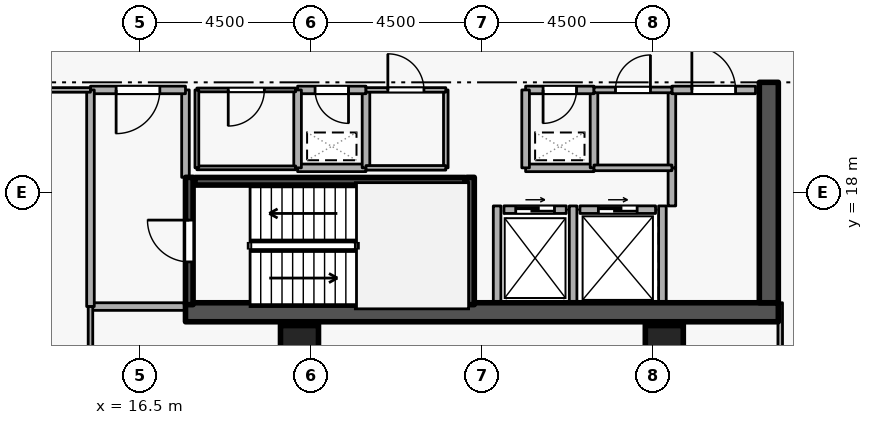
"""IFC4 building model, lengths in metres.
Left out: names, types, materials, properties, quantities, classifications, styles, units other than length and angle.
Written with IfcOpenShell. Run it as: python <this file> out.ifc"""

import sys

from ifc_helpers import new_model, si_unit, direction, frame, frame_2d, origin, origin_2d, place, context, subcontext, project, spatial, rectangle, extrude, element, fill, save


model = new_model("IFC4")
c1 = context("Model", 3, precision=1e-05, world=origin(), true_north=direction((0.0, 1.0)))
c2 = subcontext(c1, "Body", "Model", "MODEL_VIEW")
j1 = project(units=[si_unit("LENGTHUNIT", "METRE"), si_unit("PLANEANGLEUNIT", "RADIAN")], contexts=[c1])
p1 = place(None, origin())
s1 = spatial("IfcSite", under=j1, at=p1, CompositionType="ELEMENT")
p2 = place(p1, origin())
s2 = spatial("IfcBuilding", under=s1, at=p2, CompositionType="ELEMENT")
p3 = place(p2, frame((0.0, 0.0, 203.7)))
s3 = spatial("IfcBuildingStorey", under=s2, at=p3, CompositionType="ELEMENT", Elevation=203.7)
p4 = place(p3, frame((17.7, 14.85, 0.0), z_axis=(0.0, 0.0, 1.0), x_axis=(1.0, 0.0, 0.0)))
e1 = element("IfcWall", 1, at=p4, inside=s3, PredefinedType="SHEAR", context=c2, shape_type="SweptSolid", body=[
    extrude(rectangle(XDim=15.6, YDim=0.5, at=frame_2d((7.8, 0.0))), origin(), (0.0, 0.0, 1.0), 3.6),
])
p5 = place(p3, frame((33.05, 15.1, 0.0), z_axis=(0.0, 0.0, 1.0), x_axis=(0.0, 1.0, 0.0)))
e2 = element("IfcWall", 2, at=p5, inside=s3, PredefinedType="SHEAR", context=c2, shape_type="SweptSolid", body=[
    extrude(rectangle(XDim=5.8, YDim=0.5, at=frame_2d((2.9, 0.0))), origin(), (0.0, 0.0, 1.0), 3.6),
])
for number, where, z_axis, x_axis in (
    (3, (20.7, 14.0, 0.0), (0.0, 0.0, 1.0), (1.0, 0.0, 0.0)),
    (4, (30.3, 14.0, 0.0), (0.0, 0.0, 1.0), (1.0, 0.0, 0.0)),
):
    element("IfcColumn", number, at=place(p3, frame(where, z_axis=z_axis, x_axis=x_axis)), inside=s3, PredefinedType="COLUMN", context=c2, shape_type="SweptSolid", body=[
        extrude(rectangle(XDim=1.0, YDim=1.0, at=origin_2d()), origin(), (0.0, 0.0, 1.0), 3.6),
    ])
p6 = place(p3, frame((26.08, 17.55, 0.0), z_axis=(0.0, 0.0, 1.0), x_axis=(1.0, 0.0, 0.0)))
e5 = element("IfcWall", 5, at=p6, inside=s3, PredefinedType="STANDARD", context=c2, shape_type="SweptSolid", body=[
    extrude(rectangle(XDim=1.64, YDim=0.2, at=frame_2d((0.82, 0.0))), origin(), (0.0, 0.0, 1.0), 3.34),
])
p7 = place(p6, frame((0.31, 0.0, 0.0)))
e6 = element("IfcOpeningElement", 6, at=p7, cuts=e5, PredefinedType="OPENING", context=c2, shape_type="SweptSolid", body=[
    extrude(rectangle(XDim=1.02, YDim=2.06, at=frame_2d((0.51, 1.03))), frame((0.0, 0.11, 0.0), z_axis=(0.0, -1.0, 0.0), x_axis=(1.0, 0.0, 0.0)), (0.0, 0.0, 1.0), 0.22),
])
p8 = place(p3, frame((28.08, 17.55, 0.0), z_axis=(0.0, 0.0, 1.0), x_axis=(1.0, 0.0, 0.0)))
e7 = element("IfcWall", 7, at=p8, inside=s3, PredefinedType="STANDARD", context=c2, shape_type="SweptSolid", body=[
    extrude(rectangle(XDim=1.99, YDim=0.2, at=frame_2d((0.995, 0.0))), origin(), (0.0, 0.0, 1.0), 3.34),
])
p9 = place(p8, frame((0.485, 0.0, 0.0)))
e8 = element("IfcOpeningElement", 8, at=p9, cuts=e7, PredefinedType="OPENING", context=c2, shape_type="SweptSolid", body=[
    extrude(rectangle(XDim=1.02, YDim=2.06, at=frame_2d((0.51, 1.03))), frame((0.0, 0.11, 0.0), z_axis=(0.0, -1.0, 0.0), x_axis=(1.0, 0.0, 0.0)), (0.0, 0.0, 1.0), 0.22),
])
for number, where, z_axis, x_axis in (
    (9, (27.9, 15.112, 0.0), (0.0, 0.0, 1.0), (0.0, 1.0, 0.0)),
    (10, (25.9, 15.112, 0.0), (0.0, 0.0, 1.0), (0.0, 1.0, 0.0)),
    (11, (30.25, 15.112, 0.0), (0.0, 0.0, 1.0), (0.0, 1.0, 0.0)),
):
    element("IfcWall", number, at=place(p3, frame(where, z_axis=z_axis, x_axis=x_axis)), inside=s3, PredefinedType="STANDARD", context=c2, shape_type="SweptSolid", body=[
        extrude(rectangle(XDim=2.536, YDim=0.2, at=frame_2d((1.268, 0.0))), origin(), (0.0, 0.0, 1.0), 3.34),
    ])
p10 = place(p3, frame((17.8, 15.05, 0.0), z_axis=(0.0, 0.0, 1.0), x_axis=(0.0, 1.0, 0.0)))
e12 = element("IfcWall", 12, at=p10, inside=s3, PredefinedType="SHEAR", context=c2, shape_type="SweptSolid", body=[
    extrude(rectangle(XDim=3.35, YDim=0.2, at=frame_2d((1.675, 0.0))), origin(), (0.0, 0.0, 1.0), 3.6),
])
p11 = place(p10, frame((1.125, 0.0, 0.0)))
e13 = element("IfcOpeningElement", 13, at=p11, cuts=e12, PredefinedType="OPENING", context=c2, shape_type="SweptSolid", body=[
    extrude(rectangle(XDim=1.1, YDim=2.1, at=frame_2d((0.55, 1.05))), frame((0.0, 0.11, 0.0), z_axis=(0.0, -1.0, 0.0), x_axis=(1.0, 0.0, 0.0)), (0.0, 0.0, 1.0), 0.22),
])
p12 = place(p3, frame((25.2, 18.4, 0.0), z_axis=(0.0, 0.0, 1.0), x_axis=(0.0, -1.0, 0.0)))
e14 = element("IfcWall", 14, at=p12, inside=s3, PredefinedType="SHEAR", context=c2, shape_type="SweptSolid", body=[
    extrude(rectangle(XDim=3.35, YDim=0.2, at=frame_2d((1.675, 0.0))), origin(), (0.0, 0.0, 1.0), 3.6),
])
p13 = place(p3, frame((25.05, 18.297, 0.0), z_axis=(0.0, 0.0, 1.0), x_axis=(-1.0, 0.0, 0.0)))
e15 = element("IfcWall", 15, at=p13, inside=s3, PredefinedType="SHEAR", context=c2, shape_type="SweptSolid", body=[
    extrude(rectangle(XDim=7.1, YDim=0.2, at=frame_2d((3.55, 0.0))), origin(), (0.0, 0.0, 1.0), 3.6),
])
p14 = place(p3, frame((15.2, 15.0, 0.0), z_axis=(0.0, 0.0, 1.0), x_axis=(1.0, 0.0, 0.0)))
e16 = element("IfcWall", 16, at=p14, inside=s3, PredefinedType="STANDARD", context=c2, shape_type="SweptSolid", body=[
    extrude(rectangle(XDim=2.5, YDim=0.2, at=frame_2d((1.25, 0.0))), origin(), (0.0, 0.0, 1.0), 3.34),
])
p15 = place(p3, frame((17.7, 18.4, 0.0), z_axis=(0.0, 0.0, 1.0), x_axis=(0.0, 1.0, 0.0)))
e17 = element("IfcWall", 17, at=p15, inside=s3, PredefinedType="STANDARD", context=c2, shape_type="SweptSolid", body=[
    extrude(rectangle(XDim=2.3, YDim=0.2, at=frame_2d((1.15, 0.0))), origin(), (0.0, 0.0, 1.0), 2.545),
])
p16 = place(p3, frame((17.7, 20.7, 0.0), z_axis=(0.0, 0.0, 1.0), x_axis=(-1.0, 0.0, 0.0)))
e18 = element("IfcWall", 18, at=p16, inside=s3, PredefinedType="STANDARD", context=c2, shape_type="SweptSolid", body=[
    extrude(rectangle(XDim=2.5, YDim=0.2, at=frame_2d((1.25, 0.0))), origin(), (0.0, 0.0, 1.0), 3.34),
])
p17 = place(p16, frame((0.675, 0.0, 0.0)))
e19 = element("IfcOpeningElement", 19, at=p17, cuts=e18, PredefinedType="OPENING", context=c2, shape_type="SweptSolid", body=[
    extrude(rectangle(XDim=1.15, YDim=2.1, at=frame_2d((0.575, 1.05))), frame((0.0, 0.11, 0.0), z_axis=(0.0, -1.0, 0.0), x_axis=(1.0, 0.0, 0.0)), (0.0, 0.0, 1.0), 0.22),
])
p18 = place(p3, frame((15.2, 20.7, 0.0), z_axis=(0.0, 0.0, 1.0), x_axis=(0.0, -1.0, 0.0)))
e20 = element("IfcWall", 20, at=p18, inside=s3, PredefinedType="STANDARD", context=c2, shape_type="SweptSolid", body=[
    extrude(rectangle(XDim=5.7, YDim=0.2, at=frame_2d((2.85, 0.0))), origin(), (0.0, 0.0, 1.0), 3.34),
])
p19 = place(p3, frame((26.65, 18.65, 0.0), z_axis=(0.0, 0.0, 1.0), x_axis=(1.0, 0.0, 0.0)))
e21 = element("IfcWall", 21, at=p19, inside=s3, PredefinedType="STANDARD", context=c2, shape_type="SweptSolid", body=[
    extrude(rectangle(XDim=1.8, YDim=0.2, at=frame_2d((0.9, 0.0))), origin(), (0.0, 0.0, 1.0), 3.34),
])
p20 = place(p3, frame((28.45, 18.65, 0.0), z_axis=(0.0, 0.0, 1.0), x_axis=(0.0, 1.0, 0.0)))
e22 = element("IfcWall", 22, at=p20, inside=s3, PredefinedType="STANDARD", context=c2, shape_type="SweptSolid", body=[
    extrude(rectangle(XDim=2.05, YDim=0.2, at=frame_2d((1.025, 0.0))), origin(), (0.0, 0.0, 1.0), 3.34),
])
p21 = place(p3, frame((28.45, 20.7, 0.0), z_axis=(0.0, 0.0, 1.0), x_axis=(-1.0, 0.0, 0.0)))
e23 = element("IfcWall", 23, at=p21, inside=s3, PredefinedType="STANDARD", context=c2, shape_type="SweptSolid", body=[
    extrude(rectangle(XDim=1.8, YDim=0.2, at=frame_2d((0.9, 0.0))), origin(), (0.0, 0.0, 1.0), 3.34),
])
p22 = place(p21, frame((0.46, 0.0, 0.0)))
e24 = element("IfcOpeningElement", 24, at=p22, cuts=e23, PredefinedType="OPENING", context=c2, shape_type="SweptSolid", body=[
    extrude(rectangle(XDim=0.88, YDim=2.04, at=frame_2d((0.44, 1.02))), frame((0.0, 0.11, 0.0), z_axis=(0.0, -1.0, 0.0), x_axis=(1.0, 0.0, 0.0)), (0.0, 0.0, 1.0), 0.22),
])
p23 = place(p3, frame((26.65, 20.7, 0.0), z_axis=(0.0, 0.0, 1.0), x_axis=(0.0, -1.0, 0.0)))
e25 = element("IfcWall", 25, at=p23, inside=s3, PredefinedType="STANDARD", context=c2, shape_type="SweptSolid", body=[
    extrude(rectangle(XDim=2.05, YDim=0.2, at=frame_2d((1.025, 0.0))), origin(), (0.0, 0.0, 1.0), 3.34),
])
p24 = place(p3, frame((20.65, 18.65, 0.0), z_axis=(0.0, 0.0, 1.0), x_axis=(1.0, 0.0, 0.0)))
e26 = element("IfcWall", 26, at=p24, inside=s3, PredefinedType="STANDARD", context=c2, shape_type="SweptSolid", body=[
    extrude(rectangle(XDim=1.8, YDim=0.2, at=frame_2d((0.9, 0.0))), origin(), (0.0, 0.0, 1.0), 3.34),
])
p25 = place(p3, frame((22.45, 18.65, 0.0), z_axis=(0.0, 0.0, 1.0), x_axis=(0.0, 1.0, 0.0)))
e27 = element("IfcWall", 27, at=p25, inside=s3, PredefinedType="STANDARD", context=c2, shape_type="SweptSolid", body=[
    extrude(rectangle(XDim=2.05, YDim=0.2, at=frame_2d((1.025, 0.0))), origin(), (0.0, 0.0, 1.0), 3.34),
])
p26 = place(p3, frame((22.45, 20.7, 0.0), z_axis=(0.0, 0.0, 1.0), x_axis=(-1.0, 0.0, 0.0)))
e28 = element("IfcWall", 28, at=p26, inside=s3, PredefinedType="STANDARD", context=c2, shape_type="SweptSolid", body=[
    extrude(rectangle(XDim=1.8, YDim=0.2, at=frame_2d((0.9, 0.0))), origin(), (0.0, 0.0, 1.0), 3.34),
])
p27 = place(p26, frame((0.46, 0.0, 0.0)))
e29 = element("IfcOpeningElement", 29, at=p27, cuts=e28, PredefinedType="OPENING", context=c2, shape_type="SweptSolid", body=[
    extrude(rectangle(XDim=0.88, YDim=2.04, at=frame_2d((0.44, 1.02))), frame((0.0, 0.11, 0.0), z_axis=(0.0, -1.0, 0.0), x_axis=(1.0, 0.0, 0.0)), (0.0, 0.0, 1.0), 0.22),
])
p28 = place(p3, frame((20.65, 20.7, 0.0), z_axis=(0.0, 0.0, 1.0), x_axis=(0.0, -1.0, 0.0)))
e30 = element("IfcWall", 30, at=p28, inside=s3, PredefinedType="STANDARD", context=c2, shape_type="SweptSolid", body=[
    extrude(rectangle(XDim=2.05, YDim=0.2, at=frame_2d((1.025, 0.0))), origin(), (0.0, 0.0, 1.0), 3.34),
])
p29 = place(p3, frame((30.5, 17.648, 0.0), z_axis=(0.0, 0.0, 1.0), x_axis=(0.0, 1.0, 0.0)))
e31 = element("IfcWall", 31, at=p29, inside=s3, PredefinedType="STANDARD", context=c2, shape_type="SweptSolid", body=[
    extrude(rectangle(XDim=1.002, YDim=0.2, at=frame_2d((0.501, 0.0))), origin(), (0.0, 0.0, 1.0), 3.34),
])
p30 = place(p3, frame((30.5, 18.65, 0.0), z_axis=(0.0, 0.0, 1.0), x_axis=(0.0, 1.0, 0.0)))
e32 = element("IfcWall", 32, at=p30, inside=s3, PredefinedType="STANDARD", context=c2, shape_type="SweptSolid", body=[
    extrude(rectangle(XDim=2.05, YDim=0.2, at=frame_2d((1.025, 0.0))), origin(), (0.0, 0.0, 1.0), 3.34),
])
p31 = place(p3, frame((30.5, 20.7, 0.0), z_axis=(0.0, 0.0, 1.0), x_axis=(1.0, 0.0, 0.0)))
e33 = element("IfcWall", 33, at=p31, inside=s3, PredefinedType="STANDARD", context=c2, shape_type="SweptSolid", body=[
    extrude(rectangle(XDim=2.2, YDim=0.2, at=frame_2d((1.1, 0.0))), origin(), (0.0, 0.0, 1.0), 3.34),
])
p32 = place(p31, frame((0.525, 0.0, 0.0)))
e34 = element("IfcOpeningElement", 34, at=p32, cuts=e33, PredefinedType="OPENING", context=c2, shape_type="SweptSolid", body=[
    extrude(rectangle(XDim=1.15, YDim=2.1, at=frame_2d((0.575, 1.05))), frame((0.0, 0.11, 0.0), z_axis=(0.0, -1.0, 0.0), x_axis=(1.0, 0.0, 0.0)), (0.0, 0.0, 1.0), 0.22),
])
p33 = place(p3, frame((18.0, 18.65, 0.0), z_axis=(0.0, 0.0, 1.0), x_axis=(1.0, 0.0, 0.0)))
e35 = element("IfcWall", 35, at=p33, inside=s3, PredefinedType="PARTITIONING", context=c2, shape_type="SweptSolid", body=[
    extrude(rectangle(XDim=2.6, YDim=0.1, at=frame_2d((1.3, 0.0))), origin(), (0.0, 0.0, 1.0), 3.34),
])
p34 = place(p3, frame((20.6, 20.7, 0.0), z_axis=(0.0, 0.0, 1.0), x_axis=(-1.0, 0.0, 0.0)))
e36 = element("IfcWall", 36, at=p34, inside=s3, PredefinedType="PARTITIONING", context=c2, shape_type="SweptSolid", body=[
    extrude(rectangle(XDim=2.6, YDim=0.1, at=frame_2d((1.3, 0.0))), origin(), (0.0, 0.0, 1.0), 3.34),
])
p35 = place(p34, frame((0.825, 0.0, 0.0)))
e37 = element("IfcOpeningElement", 37, at=p35, cuts=e36, PredefinedType="OPENING", context=c2, shape_type="SweptSolid", body=[
    extrude(rectangle(XDim=0.95, YDim=2.1, at=frame_2d((0.475, 1.05))), frame((0.0, 0.06, 0.0), z_axis=(0.0, -1.0, 0.0), x_axis=(1.0, 0.0, 0.0)), (0.0, 0.0, 1.0), 0.12),
])
p36 = place(p3, frame((18.0, 20.7, 0.0), z_axis=(0.0, 0.0, 1.0), x_axis=(0.0, -1.0, 0.0)))
e38 = element("IfcWall", 38, at=p36, inside=s3, PredefinedType="PARTITIONING", context=c2, shape_type="SweptSolid", body=[
    extrude(rectangle(XDim=2.05, YDim=0.1, at=frame_2d((1.025, 0.0))), origin(), (0.0, 0.0, 1.0), 2.545),
])
p37 = place(p3, frame((24.55, 20.7, 0.0), z_axis=(0.0, 0.0, 1.0), x_axis=(0.0, -1.0, 0.0)))
e39 = element("IfcWall", 39, at=p37, inside=s3, PredefinedType="PARTITIONING", context=c2, shape_type="SweptSolid", body=[
    extrude(rectangle(XDim=2.05, YDim=0.12, at=frame_2d((1.025, 0.0))), origin(), (0.0, 0.0, 1.0), 3.34),
])
p38 = place(p3, frame((24.55, 18.65, 0.0), z_axis=(0.0, 0.0, 1.0), x_axis=(-1.0, 0.0, 0.0)))
e40 = element("IfcWall", 40, at=p38, inside=s3, PredefinedType="PARTITIONING", context=c2, shape_type="SweptSolid", body=[
    extrude(rectangle(XDim=2.1, YDim=0.12, at=frame_2d((1.05, 0.0))), origin(), (0.0, 0.0, 1.0), 3.34),
])
p39 = place(p3, frame((22.45, 20.7, 0.0), z_axis=(0.0, 0.0, 1.0), x_axis=(1.0, 0.0, 0.0)))
e41 = element("IfcWall", 41, at=p39, inside=s3, PredefinedType="PARTITIONING", context=c2, shape_type="SweptSolid", body=[
    extrude(rectangle(XDim=2.1, YDim=0.12, at=frame_2d((1.05, 0.0))), origin(), (0.0, 0.0, 1.0), 3.34),
])
p40 = place(p39, frame((0.575, 0.0, 0.0)))
e42 = element("IfcOpeningElement", 42, at=p40, cuts=e41, PredefinedType="OPENING", context=c2, shape_type="SweptSolid", body=[
    extrude(rectangle(XDim=0.95, YDim=2.1, at=frame_2d((0.475, 1.05))), frame((0.0, 0.07, 0.0), z_axis=(0.0, -1.0, 0.0), x_axis=(1.0, 0.0, 0.0)), (0.0, 0.0, 1.0), 0.14),
])
p41 = place(p3, frame((30.5, 18.65, 0.0), z_axis=(0.0, 0.0, 1.0), x_axis=(-1.0, 0.0, 0.0)))
e43 = element("IfcWall", 43, at=p41, inside=s3, PredefinedType="PARTITIONING", context=c2, shape_type="SweptSolid", body=[
    extrude(rectangle(XDim=2.05, YDim=0.15, at=frame_2d((1.025, 0.0))), origin(), (0.0, 0.0, 1.0), 3.34),
])
p42 = place(p3, frame((28.45, 20.7, 0.0), z_axis=(0.0, 0.0, 1.0), x_axis=(1.0, 0.0, 0.0)))
e44 = element("IfcWall", 44, at=p42, inside=s3, PredefinedType="PARTITIONING", context=c2, shape_type="SweptSolid", body=[
    extrude(rectangle(XDim=2.05, YDim=0.15, at=frame_2d((1.025, 0.0))), origin(), (0.0, 0.0, 1.0), 3.34),
])
p43 = place(p42, frame((0.565, 0.0, 0.0)))
e45 = element("IfcOpeningElement", 45, at=p43, cuts=e44, PredefinedType="OPENING", context=c2, shape_type="SweptSolid", body=[
    extrude(rectangle(XDim=0.92, YDim=2.08, at=frame_2d((0.46, 1.04))), frame((0.0, 0.085, 0.0), z_axis=(0.0, -1.0, 0.0), x_axis=(1.0, 0.0, 0.0)), (0.0, 0.0, 1.0), 0.17),
])
p44 = place(p3, frame((33.35, 9.28, 0.0), z_axis=(0.0, 0.0, 1.0), x_axis=(0.0, 1.0, 0.0)))
e46 = element("IfcWall", 46, at=p44, inside=s3, PredefinedType="PARTITIONING", context=c2, shape_type="SweptSolid", body=[
    extrude(rectangle(XDim=5.82, YDim=0.12, at=frame_2d((2.91, 0.0))), origin(), (0.0, 0.0, 1.0), 2.545),
])
p45 = place(p3, frame((13.25, 20.7, 0.0), z_axis=(0.0, 0.0, 1.0), x_axis=(1.0, 0.0, 0.0)))
e47 = element("IfcWall", 47, at=p45, inside=s3, PredefinedType="PARTITIONING", context=c2, shape_type="SweptSolid", body=[
    extrude(rectangle(XDim=1.95, YDim=0.12, at=frame_2d((0.975, 0.0))), origin(), (0.0, 0.0, 1.0), 3.34),
])
p46 = place(p3, frame((15.2, 15.0, 0.0), z_axis=(0.0, 0.0, 1.0), x_axis=(0.0, -1.0, 0.0)))
e48 = element("IfcWall", 48, at=p46, inside=s3, PredefinedType="PARTITIONING", context=c2, shape_type="SweptSolid", body=[
    extrude(rectangle(XDim=5.72, YDim=0.12, at=frame_2d((2.86, 0.0))), origin(), (0.0, 0.0, 1.0), 3.34),
])
p47 = place(p7, origin())
e49 = element("IfcDoor", 49, at=p47, inside=s3, OperationType="SLIDING_TO_LEFT", PredefinedType="DOOR", context=c2, shape_type="SweptSolid", body=[
    extrude(rectangle(XDim=1.02, YDim=2.06, at=frame_2d((0.51, 1.03))), frame((0.0, 0.025, 0.0), z_axis=(0.0, -1.0, 0.0), x_axis=(1.0, 0.0, 0.0)), (0.0, 0.0, 1.0), 0.05),
])
fill(e6, e49)
p48 = place(p9, origin())
e50 = element("IfcDoor", 50, at=p48, inside=s3, OperationType="SLIDING_TO_LEFT", PredefinedType="DOOR", context=c2, shape_type="SweptSolid", body=[
    extrude(rectangle(XDim=1.02, YDim=2.06, at=frame_2d((0.51, 1.03))), frame((0.0, 0.025, 0.0), z_axis=(0.0, -1.0, 0.0), x_axis=(1.0, 0.0, 0.0)), (0.0, 0.0, 1.0), 0.05),
])
fill(e8, e50)
p49 = place(p11, origin())
e51 = element("IfcDoor", 51, at=p49, inside=s3, OperationType="SINGLE_SWING_RIGHT", PredefinedType="DOOR", context=c2, shape_type="SweptSolid", body=[
    extrude(rectangle(XDim=1.1, YDim=2.1, at=frame_2d((0.55, 1.05))), frame((0.0, 0.025, 0.0), z_axis=(0.0, -1.0, 0.0), x_axis=(1.0, 0.0, 0.0)), (0.0, 0.0, 1.0), 0.05),
])
fill(e13, e51)
p50 = place(p17, origin())
e52 = element("IfcDoor", 52, at=p50, inside=s3, OperationType="SINGLE_SWING_RIGHT", PredefinedType="DOOR", context=c2, shape_type="SweptSolid", body=[
    extrude(rectangle(XDim=1.15, YDim=2.1, at=frame_2d((0.575, 1.05))), frame((0.0, 0.025, 0.0), z_axis=(0.0, -1.0, 0.0), x_axis=(1.0, 0.0, 0.0)), (0.0, 0.0, 1.0), 0.05),
])
fill(e19, e52)
p51 = place(p22, origin())
e53 = element("IfcDoor", 53, at=p51, inside=s3, OperationType="SINGLE_SWING_RIGHT", PredefinedType="DOOR", context=c2, shape_type="SweptSolid", body=[
    extrude(rectangle(XDim=0.88, YDim=2.04, at=frame_2d((0.44, 1.02))), frame((0.0, 0.025, 0.0), z_axis=(0.0, -1.0, 0.0), x_axis=(1.0, 0.0, 0.0)), (0.0, 0.0, 1.0), 0.05),
])
fill(e24, e53)
p52 = place(p27, origin())
e54 = element("IfcDoor", 54, at=p52, inside=s3, OperationType="SINGLE_SWING_LEFT", PredefinedType="DOOR", context=c2, shape_type="SweptSolid", body=[
    extrude(rectangle(XDim=0.88, YDim=2.04, at=frame_2d((0.44, 1.02))), frame((0.0, 0.025, 0.0), z_axis=(0.0, -1.0, 0.0), x_axis=(1.0, 0.0, 0.0)), (0.0, 0.0, 1.0), 0.05),
])
fill(e29, e54)
p53 = place(p35, origin())
e55 = element("IfcDoor", 55, at=p53, inside=s3, OperationType="SINGLE_SWING_RIGHT", PredefinedType="DOOR", context=c2, shape_type="SweptSolid", body=[
    extrude(rectangle(XDim=0.95, YDim=2.1, at=frame_2d((0.475, 1.05))), frame((0.0, 0.025, 0.0), z_axis=(0.0, -1.0, 0.0), x_axis=(1.0, 0.0, 0.0)), (0.0, 0.0, 1.0), 0.05),
])
fill(e37, e55)
p54 = place(p40, origin())
e56 = element("IfcDoor", 56, at=p54, inside=s3, OperationType="SINGLE_SWING_LEFT", PredefinedType="DOOR", context=c2, shape_type="SweptSolid", body=[
    extrude(rectangle(XDim=0.95, YDim=2.1, at=frame_2d((0.475, 1.05))), frame((0.0, 0.025, 0.0), z_axis=(0.0, -1.0, 0.0), x_axis=(1.0, 0.0, 0.0)), (0.0, 0.0, 1.0), 0.05),
])
fill(e42, e56)
p55 = place(p43, origin())
e57 = element("IfcDoor", 57, at=p55, inside=s3, OperationType="SINGLE_SWING_RIGHT", PredefinedType="DOOR", context=c2, shape_type="SweptSolid", body=[
    extrude(rectangle(XDim=0.92, YDim=2.08, at=frame_2d((0.46, 1.04))), frame((0.0, 0.025, 0.0), z_axis=(0.0, -1.0, 0.0), x_axis=(1.0, 0.0, 0.0)), (0.0, 0.0, 1.0), 0.05),
])
fill(e45, e57)
p56 = place(p32, origin())
e58 = element("IfcDoor", 58, at=p56, inside=s3, OperationType="SINGLE_SWING_LEFT", PredefinedType="DOOR", context=c2, shape_type="SweptSolid", body=[
    extrude(rectangle(XDim=1.15, YDim=2.1, at=frame_2d((0.575, 1.05))), frame((0.0, 0.025, 0.0), z_axis=(0.0, -1.0, 0.0), x_axis=(1.0, 0.0, 0.0)), (0.0, 0.0, 1.0), 0.05),
])
fill(e34, e58)
save(model, sys.argv[1])
